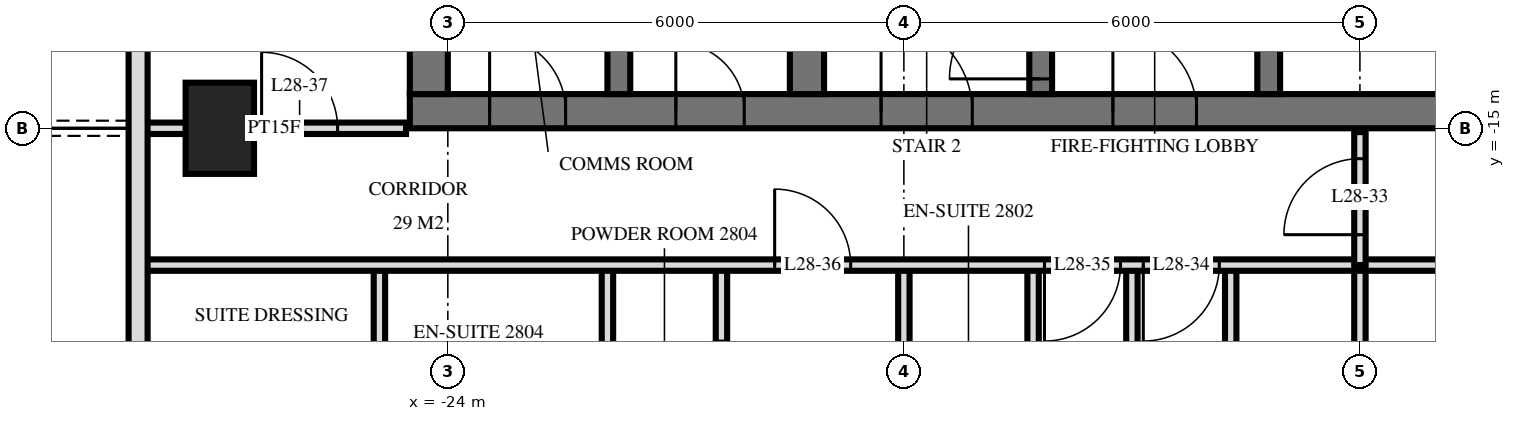
"""IFC4 building model, lengths in metres.
Left out: names, types, materials, properties, quantities, classifications, styles, units other than length and angle.
Written with IfcOpenShell. Run it as: python <this file> out.ifc"""

import sys

from ifc_helpers import new_model, si_unit, direction, frame, frame_2d, origin, origin_2d, place, context, subcontext, project, spatial, rectangle, extrude, element, fill, save


model = new_model("IFC4")
c1 = context("Model", 3, precision=1e-05, world=origin(), true_north=direction((0.0, 1.0)))
c2 = subcontext(c1, "Body", "Model", "MODEL_VIEW")
j1 = project(units=[si_unit("LENGTHUNIT", "METRE"), si_unit("PLANEANGLEUNIT", "RADIAN")], contexts=[c1])
p1 = place(None, origin())
s1 = spatial("IfcSite", under=j1, at=p1, CompositionType="ELEMENT")
p2 = place(p1, origin())
s2 = spatial("IfcBuilding", under=s1, at=p2, CompositionType="ELEMENT")
p3 = place(p2, frame((0.0, 0.0, 112.8)))
s3 = spatial("IfcBuildingStorey", under=s2, at=p3, CompositionType="ELEMENT", Elevation=112.8)
p4 = place(p3, frame((-27.0, -15.0, -0.28), z_axis=(0.0, 0.0, 1.0), x_axis=(0.0, 1.0, 0.0)))
e1 = element("IfcColumn", 1, at=p4, inside=s3, PredefinedType="COLUMN", context=c2, shape_type="SweptSolid", body=[
    extrude(rectangle(XDim=1.2, YDim=0.9, at=origin_2d()), origin(), (0.0, 0.0, 1.0), 3.88),
])
p5 = place(p3, frame((-24.5, -14.775, 0.0), z_axis=(0.0, 0.0, 1.0), x_axis=(1.0, 0.0, 0.0)))
e2 = element("IfcWall", 2, at=p5, inside=s3, PredefinedType="SHEAR", context=c2, shape_type="SweptSolid", body=[
    extrude(rectangle(XDim=14.5, YDim=0.45, at=frame_2d((7.25, 0.0))), origin(), (0.0, 0.0, 1.0), 3.6),
])
p6 = place(p5, frame((6.2, 0.0, 0.0)))
e3 = element("IfcOpeningElement", 3, at=p6, cuts=e2, PredefinedType="OPENING", context=c2, shape_type="SweptSolid", body=[
    extrude(rectangle(XDim=1.2, YDim=2.1, at=frame_2d((0.6, 1.05))), frame((0.0, 0.235, 0.0), z_axis=(0.0, -1.0, 0.0), x_axis=(1.0, 0.0, 0.0)), (0.0, 0.0, 1.0), 0.47),
])
p7 = place(p5, frame((9.25, 0.0, 0.0)))
e4 = element("IfcOpeningElement", 4, at=p7, cuts=e2, PredefinedType="OPENING", context=c2, shape_type="SweptSolid", body=[
    extrude(rectangle(XDim=1.1, YDim=2.1, at=frame_2d((0.55, 1.05))), frame((0.0, 0.235, 0.0), z_axis=(0.0, -1.0, 0.0), x_axis=(1.0, 0.0, 0.0)), (0.0, 0.0, 1.0), 0.47),
])
p8 = place(p5, frame((3.5, 0.0, 0.0)))
e5 = element("IfcOpeningElement", 5, at=p8, cuts=e2, PredefinedType="OPENING", context=c2, shape_type="SweptSolid", body=[
    extrude(rectangle(XDim=0.9, YDim=2.1, at=frame_2d((0.45, 1.05))), frame((0.0, 0.235, 0.0), z_axis=(0.0, -1.0, 0.0), x_axis=(1.0, 0.0, 0.0)), (0.0, 0.0, 1.0), 0.47),
])
p9 = place(p5, frame((1.05, 0.0, 0.0)))
e6 = element("IfcOpeningElement", 6, at=p9, cuts=e2, PredefinedType="OPENING", context=c2, shape_type="SweptSolid", body=[
    extrude(rectangle(XDim=1.0, YDim=2.1, at=frame_2d((0.5, 1.05))), frame((0.0, 0.235, 0.0), z_axis=(0.0, -1.0, 0.0), x_axis=(1.0, 0.0, 0.0)), (0.0, 0.0, 1.0), 0.47),
])
p10 = place(p3, frame((-24.25, -14.55, 0.0), z_axis=(0.0, 0.0, 1.0), x_axis=(0.0, 1.0, 0.0)))
e7 = element("IfcWall", 7, at=p10, inside=s3, PredefinedType="SHEAR", context=c2, shape_type="SweptSolid", body=[
    extrude(rectangle(XDim=14.1, YDim=0.5, at=frame_2d((7.05, 0.0))), origin(), (0.0, 0.0, 1.0), 3.6),
])
p11 = place(p3, frame((-13.2, -14.55, 0.0), z_axis=(0.0, 0.0, 1.0), x_axis=(0.0, 1.0, 0.0)))
e8 = element("IfcWall", 8, at=p11, inside=s3, PredefinedType="SHEAR", context=c2, shape_type="SweptSolid", body=[
    extrude(rectangle(XDim=5.4, YDim=0.3, at=frame_2d((2.7, 0.0))), origin(), (0.0, 0.0, 1.0), 3.6),
])
p12 = place(p11, frame((4.0, 0.0, 0.0)))
e9 = element("IfcOpeningElement", 9, at=p12, cuts=e8, PredefinedType="OPENING", context=c2, shape_type="SweptSolid", body=[
    extrude(rectangle(XDim=1.2, YDim=2.1, at=frame_2d((0.6, 1.05))), frame((0.0, 0.16, 0.0), z_axis=(0.0, -1.0, 0.0), x_axis=(1.0, 0.0, 0.0)), (0.0, 0.0, 1.0), 0.32),
])
p13 = place(p3, frame((-16.2, -14.55, 0.0), z_axis=(0.0, 0.0, 1.0), x_axis=(0.0, 1.0, 0.0)))
e10 = element("IfcWall", 10, at=p13, inside=s3, PredefinedType="SHEAR", context=c2, shape_type="SweptSolid", body=[
    extrude(rectangle(XDim=5.4, YDim=0.3, at=frame_2d((2.7, 0.0))), origin(), (0.0, 0.0, 1.0), 3.6),
])
p14 = place(p13, frame((0.2, 0.0, 0.0)))
e11 = element("IfcOpeningElement", 11, at=p14, cuts=e10, PredefinedType="OPENING", context=c2, shape_type="SweptSolid", body=[
    extrude(rectangle(XDim=1.2, YDim=2.1, at=frame_2d((0.6, 1.05))), frame((0.0, 0.16, 0.0), z_axis=(0.0, -1.0, 0.0), x_axis=(1.0, 0.0, 0.0)), (0.0, 0.0, 1.0), 0.32),
])
p15 = place(p3, frame((-19.275, -14.55, 0.0), z_axis=(0.0, 0.0, 1.0), x_axis=(0.0, 1.0, 0.0)))
e12 = element("IfcWall", 12, at=p15, inside=s3, PredefinedType="SHEAR", context=c2, shape_type="SweptSolid", body=[
    extrude(rectangle(XDim=5.4, YDim=0.45, at=frame_2d((2.7, 0.0))), origin(), (0.0, 0.0, 1.0), 3.6),
])
p16 = place(p3, frame((-21.75, -14.55, 0.0), z_axis=(0.0, 0.0, 1.0), x_axis=(0.0, 1.0, 0.0)))
e13 = element("IfcWall", 13, at=p16, inside=s3, PredefinedType="SHEAR", context=c2, shape_type="SweptSolid", body=[
    extrude(rectangle(XDim=5.4, YDim=0.3, at=frame_2d((2.7, 0.0))), origin(), (0.0, 0.0, 1.0), 3.6),
])
p17 = place(p3, frame((-28.075, -3.325, 0.0), z_axis=(0.0, 0.0, 1.0), x_axis=(0.0, -1.0, 0.0)))
e14 = element("IfcWall", 14, at=p17, inside=s3, PredefinedType="SOLIDWALL", context=c2, shape_type="SweptSolid", body=[
    extrude(rectangle(XDim=25.951, YDim=0.25, at=frame_2d((12.975, 0.0))), origin(), (0.0, 0.0, 1.0), 3.32),
])
p18 = place(p17, frame((7.025, 0.0, 0.0)))
e15 = element("IfcOpeningElement", 15, at=p18, cuts=e14, PredefinedType="OPENING", context=c2, shape_type="SweptSolid", body=[
    extrude(rectangle(XDim=1.8, YDim=2.4, at=frame_2d((0.9, 1.2))), frame((0.0, 0.135, 0.0), z_axis=(0.0, -1.0, 0.0), x_axis=(1.0, 0.0, 0.0)), (0.0, 0.0, 1.0), 0.27),
])
p19 = place(p17, frame((18.175, 0.0, 0.0)))
e16 = element("IfcOpeningElement", 16, at=p19, cuts=e14, PredefinedType="OPENING", context=c2, shape_type="SweptSolid", body=[
    extrude(rectangle(XDim=1.8, YDim=2.4, at=frame_2d((0.9, 1.2))), frame((0.0, 0.135, 0.0), z_axis=(0.0, -1.0, 0.0), x_axis=(1.0, 0.0, 0.0)), (0.0, 0.0, 1.0), 0.27),
])
p20 = place(p17, frame((21.075, 0.0, 0.0)))
e17 = element("IfcOpeningElement", 17, at=p20, cuts=e14, PredefinedType="OPENING", context=c2, shape_type="SweptSolid", body=[
    extrude(rectangle(XDim=1.8, YDim=2.4, at=frame_2d((0.9, 1.2))), frame((0.0, 0.135, 0.0), z_axis=(0.0, -1.0, 0.0), x_axis=(1.0, 0.0, 0.0)), (0.0, 0.0, 1.0), 0.27),
])
p21 = place(p17, frame((23.825, 0.0, 0.3)))
e18 = element("IfcOpeningElement", 18, at=p21, cuts=e14, PredefinedType="OPENING", context=c2, shape_type="SweptSolid", body=[
    extrude(rectangle(XDim=1.8, YDim=2.1, at=frame_2d((0.9, 1.05))), frame((0.0, 0.135, 0.0), z_axis=(0.0, -1.0, 0.0), x_axis=(1.0, 0.0, 0.0)), (0.0, 0.0, 1.0), 0.27),
])
p22 = place(p3, frame((-12.0, -16.8, 0.0), z_axis=(0.0, 0.0, 1.0), x_axis=(0.0, 1.0, 0.0)))
e19 = element("IfcWall", 19, at=p22, inside=s3, PredefinedType="PARTITIONING", context=c2, shape_type="SweptSolid", body=[
    extrude(rectangle(XDim=1.75, YDim=0.15, at=frame_2d((0.875, 0.0))), origin(), (0.0, 0.0, 1.0), 3.32),
])
p23 = place(p22, frame((0.4, 0.0, 0.0)))
e20 = element("IfcOpeningElement", 20, at=p23, cuts=e19, PredefinedType="OPENING", context=c2, shape_type="SweptSolid", body=[
    extrude(rectangle(XDim=1.0, YDim=2.1, at=frame_2d((0.5, 1.05))), frame((0.0, 0.085, 0.0), z_axis=(0.0, -1.0, 0.0), x_axis=(1.0, 0.0, 0.0)), (0.0, 0.0, 1.0), 0.17),
])
p24 = place(p3, frame((-12.0, -33.62, 0.0), z_axis=(0.0, 0.0, 1.0), x_axis=(0.0, 1.0, 0.0)))
e21 = element("IfcWall", 21, at=p24, inside=s3, PredefinedType="PARTITIONING", context=c2, shape_type="SweptSolid", body=[
    extrude(rectangle(XDim=16.82, YDim=0.15, at=frame_2d((8.41, 0.0))), origin(), (0.0, 0.0, 1.0), 3.32),
])
p25 = place(p3, frame((-13.7, -20.6, 0.0), z_axis=(0.0, 0.0, 1.0), x_axis=(0.0, 1.0, 0.0)))
e22 = element("IfcWall", 22, at=p25, inside=s3, PredefinedType="PARTITIONING", context=c2, shape_type="SweptSolid", body=[
    extrude(rectangle(XDim=3.8, YDim=0.15, at=frame_2d((1.9, 0.0))), origin(), (0.0, 0.0, 1.0), 3.32),
])
p26 = place(p25, frame((1.5, 0.0, 0.0)))
e23 = element("IfcOpeningElement", 23, at=p26, cuts=e22, PredefinedType="OPENING", context=c2, shape_type="SweptSolid", body=[
    extrude(rectangle(XDim=0.8, YDim=2.1, at=frame_2d((0.4, 1.05))), frame((0.0, 0.085, 0.0), z_axis=(0.0, -1.0, 0.0), x_axis=(1.0, 0.0, 0.0)), (0.0, 0.0, 1.0), 0.17),
])
p27 = place(p3, frame((-15.0, -33.62, 0.0), z_axis=(0.0, 0.0, 1.0), x_axis=(0.0, 1.0, 0.0)))
e24 = element("IfcWall", 24, at=p27, inside=s3, PredefinedType="PARTITIONING", context=c2, shape_type="SweptSolid", body=[
    extrude(rectangle(XDim=16.82, YDim=0.15, at=frame_2d((8.41, 0.0))), origin(), (0.0, 0.0, 1.0), 3.32),
])
p28 = place(p3, frame((-16.3, -20.6, 0.0), z_axis=(0.0, 0.0, 1.0), x_axis=(0.0, 1.0, 0.0)))
e25 = element("IfcWall", 25, at=p28, inside=s3, PredefinedType="PARTITIONING", context=c2, shape_type="SweptSolid", body=[
    extrude(rectangle(XDim=3.8, YDim=0.15, at=frame_2d((1.9, 0.0))), origin(), (0.0, 0.0, 1.0), 3.32),
])
p29 = place(p28, frame((1.5, 0.0, 0.0)))
e26 = element("IfcOpeningElement", 26, at=p29, cuts=e25, PredefinedType="OPENING", context=c2, shape_type="SweptSolid", body=[
    extrude(rectangle(XDim=0.8, YDim=2.1, at=frame_2d((0.4, 1.05))), frame((0.0, 0.085, 0.0), z_axis=(0.0, -1.0, 0.0), x_axis=(1.0, 0.0, 0.0)), (0.0, 0.0, 1.0), 0.17),
])
p30 = place(p3, frame((-18.0, -19.8, 0.0), z_axis=(0.0, 0.0, 1.0), x_axis=(0.0, 1.0, 0.0)))
e27 = element("IfcWall", 27, at=p30, inside=s3, PredefinedType="PARTITIONING", context=c2, shape_type="SweptSolid", body=[
    extrude(rectangle(XDim=3.0, YDim=0.15, at=frame_2d((1.5, 0.0))), origin(), (0.0, 0.0, 1.0), 3.32),
])
p31 = place(p3, frame((-20.4, -19.8, 0.0), z_axis=(0.0, 0.0, 1.0), x_axis=(0.0, 1.0, 0.0)))
e28 = element("IfcWall", 28, at=p31, inside=s3, PredefinedType="PARTITIONING", context=c2, shape_type="SweptSolid", body=[
    extrude(rectangle(XDim=3.0, YDim=0.15, at=frame_2d((1.5, 0.0))), origin(), (0.0, 0.0, 1.0), 3.32),
])
p32 = place(p31, frame((1.0, 0.0, 0.0)))
e29 = element("IfcOpeningElement", 29, at=p32, cuts=e28, PredefinedType="OPENING", context=c2, shape_type="SweptSolid", body=[
    extrude(rectangle(XDim=1.0, YDim=2.1, at=frame_2d((0.5, 1.05))), frame((0.0, 0.085, 0.0), z_axis=(0.0, -1.0, 0.0), x_axis=(1.0, 0.0, 0.0)), (0.0, 0.0, 1.0), 0.17),
])
p33 = place(p3, frame((-21.9, -19.8, 0.0), z_axis=(0.0, 0.0, 1.0), x_axis=(0.0, 1.0, 0.0)))
e30 = element("IfcWall", 30, at=p33, inside=s3, PredefinedType="PLUMBINGWALL", context=c2, shape_type="SweptSolid", body=[
    extrude(rectangle(XDim=3.0, YDim=0.15, at=frame_2d((1.5, 0.0))), origin(), (0.0, 0.0, 1.0), 3.32),
])
p34 = place(p3, frame((-24.9, -19.8, 0.0), z_axis=(0.0, 0.0, 1.0), x_axis=(0.0, 1.0, 0.0)))
e31 = element("IfcWall", 31, at=p34, inside=s3, PredefinedType="PARTITIONING", context=c2, shape_type="SweptSolid", body=[
    extrude(rectangle(XDim=3.0, YDim=0.15, at=frame_2d((1.5, 0.0))), origin(), (0.0, 0.0, 1.0), 3.32),
])
p35 = place(p3, frame((-28.02, -16.8, 0.0), z_axis=(0.0, 0.0, 1.0), x_axis=(1.0, 0.0, 0.0)))
e32 = element("IfcWall", 32, at=p35, inside=s3, PredefinedType="PARTITIONING", context=c2, shape_type="SweptSolid", body=[
    extrude(rectangle(XDim=56.04, YDim=0.15, at=frame_2d((28.02, 0.0))), origin(), (0.0, 0.0, 1.0), 3.32),
])
p36 = place(p35, frame((13.17, 0.0, 0.0)))
e33 = element("IfcOpeningElement", 33, at=p36, cuts=e32, PredefinedType="OPENING", context=c2, shape_type="SweptSolid", body=[
    extrude(rectangle(XDim=1.0, YDim=2.1, at=frame_2d((0.5, 1.05))), frame((0.0, 0.085, 0.0), z_axis=(0.0, -1.0, 0.0), x_axis=(1.0, 0.0, 0.0)), (0.0, 0.0, 1.0), 0.17),
])
p37 = place(p35, frame((11.87, 0.0, 0.0)))
e34 = element("IfcOpeningElement", 34, at=p37, cuts=e32, PredefinedType="OPENING", context=c2, shape_type="SweptSolid", body=[
    extrude(rectangle(XDim=1.0, YDim=2.1, at=frame_2d((0.5, 1.05))), frame((0.0, 0.085, 0.0), z_axis=(0.0, -1.0, 0.0), x_axis=(1.0, 0.0, 0.0)), (0.0, 0.0, 1.0), 0.17),
])
p38 = place(p35, frame((8.32, 0.0, 0.0)))
e35 = element("IfcOpeningElement", 35, at=p38, cuts=e32, PredefinedType="OPENING", context=c2, shape_type="SweptSolid", body=[
    extrude(rectangle(XDim=1.0, YDim=2.1, at=frame_2d((0.5, 1.05))), frame((0.0, 0.085, 0.0), z_axis=(0.0, -1.0, 0.0), x_axis=(1.0, 0.0, 0.0)), (0.0, 0.0, 1.0), 0.17),
])
p39 = place(p35, frame((40.42, 0.0, 0.0)))
e36 = element("IfcOpeningElement", 36, at=p39, cuts=e32, PredefinedType="OPENING", context=c2, shape_type="SweptSolid", body=[
    extrude(rectangle(XDim=1.0, YDim=2.1, at=frame_2d((0.5, 1.05))), frame((0.0, 0.085, 0.0), z_axis=(0.0, -1.0, 0.0), x_axis=(1.0, 0.0, 0.0)), (0.0, 0.0, 1.0), 0.17),
])
p40 = place(p35, frame((46.72, 0.0, 0.0)))
e37 = element("IfcOpeningElement", 37, at=p40, cuts=e32, PredefinedType="OPENING", context=c2, shape_type="SweptSolid", body=[
    extrude(rectangle(XDim=1.0, YDim=2.1, at=frame_2d((0.5, 1.05))), frame((0.0, 0.085, 0.0), z_axis=(0.0, -1.0, 0.0), x_axis=(1.0, 0.0, 0.0)), (0.0, 0.0, 1.0), 0.17),
])
p41 = place(p35, frame((21.52, 0.0, 0.0)))
e38 = element("IfcOpeningElement", 38, at=p41, cuts=e32, PredefinedType="OPENING", context=c2, shape_type="SweptSolid", body=[
    extrude(rectangle(XDim=1.0, YDim=2.1, at=frame_2d((0.5, 1.05))), frame((0.0, 0.085, 0.0), z_axis=(0.0, -1.0, 0.0), x_axis=(1.0, 0.0, 0.0)), (0.0, 0.0, 1.0), 0.17),
])
p42 = place(p35, frame((30.52, 0.0, 0.0)))
e39 = element("IfcOpeningElement", 39, at=p42, cuts=e32, PredefinedType="OPENING", context=c2, shape_type="SweptSolid", body=[
    extrude(rectangle(XDim=1.0, YDim=2.1, at=frame_2d((0.5, 1.05))), frame((0.0, 0.085, 0.0), z_axis=(0.0, -1.0, 0.0), x_axis=(1.0, 0.0, 0.0)), (0.0, 0.0, 1.0), 0.17),
])
p43 = place(p35, frame((36.52, 0.0, 0.0)))
e40 = element("IfcOpeningElement", 40, at=p43, cuts=e32, PredefinedType="OPENING", context=c2, shape_type="SweptSolid", body=[
    extrude(rectangle(XDim=1.0, YDim=2.1, at=frame_2d((0.5, 1.05))), frame((0.0, 0.085, 0.0), z_axis=(0.0, -1.0, 0.0), x_axis=(1.0, 0.0, 0.0)), (0.0, 0.0, 1.0), 0.17),
])
p44 = place(p3, frame((-28.02, -15.0, 0.0), z_axis=(0.0, 0.0, 1.0), x_axis=(1.0, 0.0, 0.0)))
e41 = element("IfcWall", 41, at=p44, inside=s3, PredefinedType="PARTITIONING", context=c2, shape_type="SweptSolid", body=[
    extrude(rectangle(XDim=3.47, YDim=0.15, at=frame_2d((1.735, 0.0))), origin(), (0.0, 0.0, 1.0), 3.32),
])
p45 = place(p44, frame((1.57, 0.0, 0.0)))
e42 = element("IfcOpeningElement", 42, at=p45, cuts=e41, PredefinedType="OPENING", context=c2, shape_type="SweptSolid", body=[
    extrude(rectangle(XDim=1.0, YDim=2.1, at=frame_2d((0.5, 1.05))), frame((0.0, 0.085, 0.0), z_axis=(0.0, -1.0, 0.0), x_axis=(1.0, 0.0, 0.0)), (0.0, 0.0, 1.0), 0.17),
])
p46 = place(p6, origin())
e43 = element("IfcDoor", 43, at=p46, inside=s3, OperationType="SINGLE_SWING_RIGHT", PredefinedType="DOOR", context=c2, shape_type="SweptSolid", body=[
    extrude(rectangle(XDim=1.2, YDim=2.1, at=frame_2d((0.6, 1.05))), frame((0.0, 0.025, 0.0), z_axis=(0.0, -1.0, 0.0), x_axis=(1.0, 0.0, 0.0)), (0.0, 0.0, 1.0), 0.05),
])
fill(e3, e43)
p47 = place(p7, origin())
e44 = element("IfcDoor", 44, at=p47, inside=s3, OperationType="SINGLE_SWING_RIGHT", PredefinedType="DOOR", context=c2, shape_type="SweptSolid", body=[
    extrude(rectangle(XDim=1.1, YDim=2.1, at=frame_2d((0.55, 1.05))), frame((0.0, 0.025, 0.0), z_axis=(0.0, -1.0, 0.0), x_axis=(1.0, 0.0, 0.0)), (0.0, 0.0, 1.0), 0.05),
])
fill(e4, e44)
p48 = place(p8, origin())
e45 = element("IfcDoor", 45, at=p48, inside=s3, OperationType="SINGLE_SWING_RIGHT", PredefinedType="DOOR", context=c2, shape_type="SweptSolid", body=[
    extrude(rectangle(XDim=0.9, YDim=2.1, at=frame_2d((0.45, 1.05))), frame((0.0, 0.025, 0.0), z_axis=(0.0, -1.0, 0.0), x_axis=(1.0, 0.0, 0.0)), (0.0, 0.0, 1.0), 0.05),
])
fill(e5, e45)
p49 = place(p9, origin())
e46 = element("IfcDoor", 46, at=p49, inside=s3, OperationType="SINGLE_SWING_RIGHT", PredefinedType="DOOR", context=c2, shape_type="SweptSolid", body=[
    extrude(rectangle(XDim=1.0, YDim=2.1, at=frame_2d((0.5, 1.05))), frame((0.0, 0.025, 0.0), z_axis=(0.0, -1.0, 0.0), x_axis=(1.0, 0.0, 0.0)), (0.0, 0.0, 1.0), 0.05),
])
fill(e6, e46)
p50 = place(p14, origin())
e47 = element("IfcDoor", 47, at=p50, inside=s3, OperationType="SINGLE_SWING_RIGHT", PredefinedType="DOOR", context=c2, shape_type="SweptSolid", body=[
    extrude(rectangle(XDim=1.2, YDim=2.1, at=frame_2d((0.6, 1.05))), frame((0.0, 0.025, 0.0), z_axis=(0.0, -1.0, 0.0), x_axis=(1.0, 0.0, 0.0)), (0.0, 0.0, 1.0), 0.05),
])
fill(e11, e47)
p51 = place(p23, origin())
e48 = element("IfcDoor", 48, at=p51, inside=s3, OperationType="SINGLE_SWING_RIGHT", PredefinedType="DOOR", context=c2, shape_type="SweptSolid", body=[
    extrude(rectangle(XDim=1.0, YDim=2.1, at=frame_2d((0.5, 1.05))), frame((0.0, 0.025, 0.0), z_axis=(0.0, -1.0, 0.0), x_axis=(1.0, 0.0, 0.0)), (0.0, 0.0, 1.0), 0.05),
])
fill(e20, e48)
p52 = place(p36, frame((0.5, 0.0, 0.0), z_axis=(0.0, 0.0, 1.0), x_axis=(-1.0, 0.0, 0.0)))
e49 = element("IfcDoor", 49, at=p52, inside=s3, OperationType="SINGLE_SWING_LEFT", PredefinedType="DOOR", context=c2, shape_type="SweptSolid", body=[
    extrude(rectangle(XDim=1.0, YDim=2.1, at=frame_2d((0.0, 1.05))), frame((0.0, -0.025, 0.0), z_axis=(0.0, 1.0, 0.0), x_axis=(-1.0, 0.0, 0.0)), (0.0, 0.0, 1.0), 0.05),
])
fill(e33, e49)
p53 = place(p37, frame((0.5, 0.0, 0.0), z_axis=(0.0, 0.0, 1.0), x_axis=(-1.0, 0.0, 0.0)))
e50 = element("IfcDoor", 50, at=p53, inside=s3, OperationType="SINGLE_SWING_LEFT", PredefinedType="DOOR", context=c2, shape_type="SweptSolid", body=[
    extrude(rectangle(XDim=1.0, YDim=2.1, at=frame_2d((0.0, 1.05))), frame((0.0, -0.025, 0.0), z_axis=(0.0, 1.0, 0.0), x_axis=(-1.0, 0.0, 0.0)), (0.0, 0.0, 1.0), 0.05),
])
fill(e34, e50)
p54 = place(p38, origin())
e51 = element("IfcDoor", 51, at=p54, inside=s3, OperationType="SINGLE_SWING_RIGHT", PredefinedType="DOOR", context=c2, shape_type="SweptSolid", body=[
    extrude(rectangle(XDim=1.0, YDim=2.1, at=frame_2d((0.5, 1.05))), frame((0.0, 0.025, 0.0), z_axis=(0.0, -1.0, 0.0), x_axis=(1.0, 0.0, 0.0)), (0.0, 0.0, 1.0), 0.05),
])
fill(e35, e51)
p55 = place(p45, origin())
e52 = element("IfcDoor", 52, at=p55, inside=s3, OperationType="SINGLE_SWING_RIGHT", PredefinedType="DOOR", context=c2, shape_type="SweptSolid", body=[
    extrude(rectangle(XDim=1.0, YDim=2.1, at=frame_2d((0.5, 1.05))), frame((0.0, 0.025, 0.0), z_axis=(0.0, -1.0, 0.0), x_axis=(1.0, 0.0, 0.0)), (0.0, 0.0, 1.0), 0.05),
])
fill(e42, e52)
save(model, sys.argv[1])
